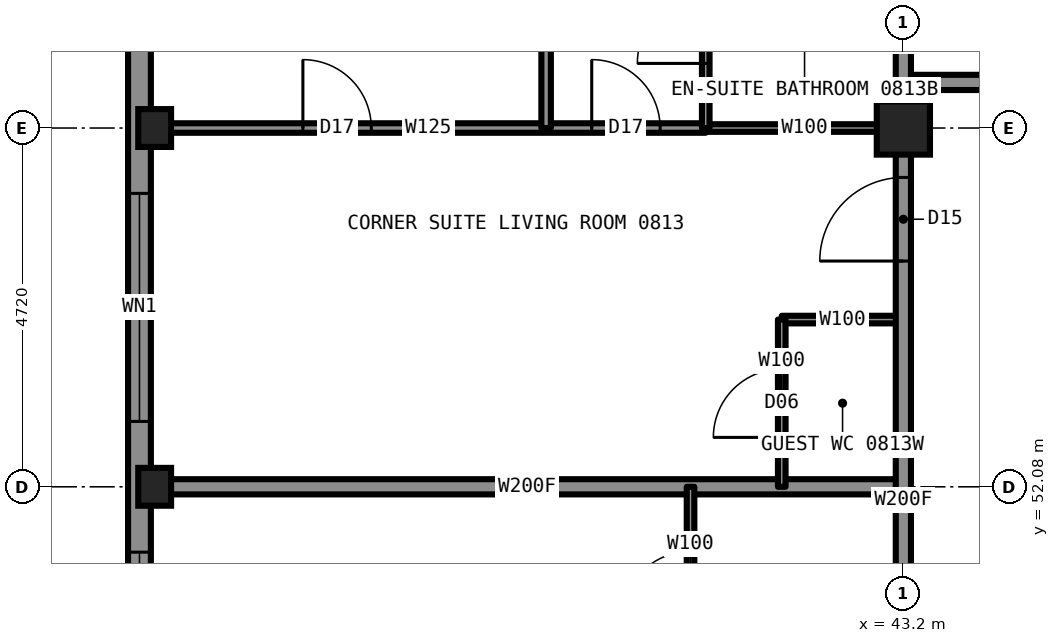
"""IFC4 building model, lengths in metres.
Left out: names, types, materials, properties, quantities, classifications, styles, units other than length and angle.
Written with IfcOpenShell. Run it as: python <this file> out.ifc"""

import sys

from ifc_helpers import new_model, si_unit, direction, frame, frame_2d, origin, origin_2d, place, context, subcontext, project, spatial, rectangle, hollow_rectangle, i_section, extrude, element, fill, save


model = new_model("IFC4")
c1 = context("Model", 3, precision=1e-05, world=origin(), true_north=direction((0.0, 1.0)))
c2 = subcontext(c1, "Body", "Model", "MODEL_VIEW")
j1 = project(units=[si_unit("LENGTHUNIT", "METRE"), si_unit("PLANEANGLEUNIT", "RADIAN")], contexts=[c1])
p1 = place(None, origin())
s1 = spatial("IfcSite", under=j1, at=p1, CompositionType="ELEMENT")
p2 = place(p1, origin())
s2 = spatial("IfcBuilding", under=s1, at=p2, CompositionType="ELEMENT")
p3 = place(p2, frame((0.0, 0.0, 28.5)))
s3 = spatial("IfcBuildingStorey", under=s2, at=p3, CompositionType="ELEMENT", Elevation=28.5)
for number, where, z_axis, x_axis in (
    (1, (33.35, 52.08, 0.0), (0.0, 0.0, 1.0), (1.0, 0.0, 0.0)),
    (2, (33.35, 56.8, 0.0), (0.0, 0.0, 1.0), (1.0, 0.0, 0.0)),
):
    element("IfcColumn", number, at=place(p3, frame(where, z_axis=z_axis, x_axis=x_axis)), inside=s3, PredefinedType="COLUMN", context=c2, shape_type="SweptSolid", body=[
        extrude(i_section(OverallWidth=0.432, OverallDepth=0.498, WebThickness=0.056, FlangeThickness=0.089, at=origin_2d()), origin(), (0.0, 0.0, 1.0), 3.5),
    ])
p4 = place(p3, frame((43.2, 56.8, 0.0), z_axis=(0.0, 0.0, 1.0), x_axis=(1.0, 0.0, 0.0)))
e3 = element("IfcColumn", 3, at=p4, inside=s3, PredefinedType="COLUMN", context=c2, shape_type="SweptSolid", body=[
    extrude(hollow_rectangle(XDim=0.7, YDim=0.7, WallThickness=0.06, at=origin_2d()), origin(), (0.0, 0.0, 1.0), 3.5),
])
p5 = place(p3, frame((40.6, 56.8, 0.0), z_axis=(0.0, 0.0, 1.0), x_axis=(1.0, 0.0, 0.0)))
e4 = element("IfcWall", 4, at=p5, inside=s3, PredefinedType="PARTITIONING", context=c2, shape_type="SweptSolid", body=[
    extrude(rectangle(XDim=2.6, YDim=0.1, at=frame_2d((1.3, 0.0))), origin(), (0.0, 0.0, 1.0), 2.573),
])
p6 = place(p3, frame((33.3, 56.8, 0.0), z_axis=(0.0, 0.0, 1.0), x_axis=(1.0, 0.0, 0.0)))
e5 = element("IfcWall", 5, at=p6, inside=s3, PredefinedType="PARTITIONING", context=c2, shape_type="SweptSolid", body=[
    extrude(rectangle(XDim=7.3, YDim=0.125, at=frame_2d((3.65, 0.0))), origin(), (0.0, 0.0, 1.0), 2.573),
])
p7 = place(p6, frame((5.8, 0.0, 0.0)))
e6 = element("IfcOpeningElement", 6, at=p7, cuts=e5, PredefinedType="OPENING", context=c2, shape_type="SweptSolid", body=[
    extrude(rectangle(XDim=0.9, YDim=2.2, at=frame_2d((0.45, 1.1))), frame((0.0, 0.073, 0.0), z_axis=(0.0, -1.0, 0.0), x_axis=(1.0, 0.0, 0.0)), (0.0, 0.0, 1.0), 0.145),
])
p8 = place(p6, frame((2.0, 0.0, 0.0)))
e7 = element("IfcOpeningElement", 7, at=p8, cuts=e5, PredefinedType="OPENING", context=c2, shape_type="SweptSolid", body=[
    extrude(rectangle(XDim=0.9, YDim=2.2, at=frame_2d((0.45, 1.1))), frame((0.0, 0.073, 0.0), z_axis=(0.0, -1.0, 0.0), x_axis=(1.0, 0.0, 0.0)), (0.0, 0.0, 1.0), 0.145),
])
p9 = place(p3, frame((43.2, 57.4, 0.0), z_axis=(0.0, 0.0, 1.0), x_axis=(1.0, 0.0, 0.0)))
e8 = element("IfcWall", 8, at=p9, inside=s3, PredefinedType="PARTITIONING", context=c2, shape_type="SweptSolid", body=[
    extrude(rectangle(XDim=23.6, YDim=0.2, at=frame_2d((11.8, 0.0))), origin(), (0.0, 0.0, 1.0), 3.33),
])
p10 = place(p9, frame((1.85, 0.0, 0.0)))
e9 = element("IfcOpeningElement", 9, at=p10, cuts=e8, PredefinedType="OPENING", context=c2, shape_type="SweptSolid", body=[
    extrude(rectangle(XDim=1.1, YDim=2.2, at=frame_2d((0.55, 1.1))), frame((0.0, 0.11, 0.0), z_axis=(0.0, -1.0, 0.0), x_axis=(1.0, 0.0, 0.0)), (0.0, 0.0, 1.0), 0.22),
])
p11 = place(p9, frame((15.62, 0.0, 0.0)))
e10 = element("IfcOpeningElement", 10, at=p11, cuts=e8, PredefinedType="OPENING", context=c2, shape_type="SweptSolid", body=[
    extrude(rectangle(XDim=1.0, YDim=2.2, at=frame_2d((0.5, 1.1))), frame((0.0, 0.11, 0.0), z_axis=(0.0, -1.0, 0.0), x_axis=(1.0, 0.0, 0.0)), (0.0, 0.0, 1.0), 0.22),
])
p12 = place(p9, frame((20.34, 0.0, 0.0)))
e11 = element("IfcOpeningElement", 11, at=p12, cuts=e8, PredefinedType="OPENING", context=c2, shape_type="SweptSolid", body=[
    extrude(rectangle(XDim=1.0, YDim=2.2, at=frame_2d((0.5, 1.1))), frame((0.0, 0.11, 0.0), z_axis=(0.0, -1.0, 0.0), x_axis=(1.0, 0.0, 0.0)), (0.0, 0.0, 1.0), 0.22),
])
p13 = place(p3, frame((33.3, 52.08, 0.0), z_axis=(0.0, 0.0, 1.0), x_axis=(1.0, 0.0, 0.0)))
e12 = element("IfcWall", 12, at=p13, inside=s3, PredefinedType="PARTITIONING", context=c2, shape_type="SweptSolid", body=[
    extrude(rectangle(XDim=9.9, YDim=0.2, at=frame_2d((4.95, 0.0))), origin(), (0.0, 0.0, 1.0), 2.573),
])
p14 = place(p3, frame((41.6, 54.28, 0.0), z_axis=(0.0, 0.0, 1.0), x_axis=(1.0, 0.0, 0.0)))
e13 = element("IfcWall", 13, at=p14, inside=s3, PredefinedType="PARTITIONING", context=c2, shape_type="SweptSolid", body=[
    extrude(rectangle(XDim=1.6, YDim=0.1, at=frame_2d((0.8, 0.0))), origin(), (0.0, 0.0, 1.0), 2.723),
])
p15 = place(p3, frame((43.2, 33.22, 0.0), z_axis=(0.0, 0.0, 1.0), x_axis=(0.0, 1.0, 0.0)))
e14 = element("IfcWall", 14, at=p15, inside=s3, PredefinedType="PARTITIONING", context=c2, shape_type="SweptSolid", body=[
    extrude(rectangle(XDim=23.56, YDim=0.2, at=frame_2d((11.78, 0.0))), origin(), (0.0, 0.0, 1.0), 3.33),
])
p16 = place(p15, frame((6.16, 0.0, 0.0)))
e15 = element("IfcOpeningElement", 15, at=p16, cuts=e14, PredefinedType="OPENING", context=c2, shape_type="SweptSolid", body=[
    extrude(rectangle(XDim=1.0, YDim=2.2, at=frame_2d((0.5, 1.1))), frame((0.0, 0.11, 0.0), z_axis=(0.0, -1.0, 0.0), x_axis=(1.0, 0.0, 0.0)), (0.0, 0.0, 1.0), 0.22),
])
p17 = place(p15, frame((11.68, 0.0, 0.0)))
e16 = element("IfcOpeningElement", 16, at=p17, cuts=e14, PredefinedType="OPENING", context=c2, shape_type="SweptSolid", body=[
    extrude(rectangle(XDim=1.0, YDim=2.2, at=frame_2d((0.5, 1.1))), frame((0.0, 0.11, 0.0), z_axis=(0.0, -1.0, 0.0), x_axis=(1.0, 0.0, 0.0)), (0.0, 0.0, 1.0), 0.22),
])
p18 = place(p15, frame((14.54, 0.0, 0.0)))
e17 = element("IfcOpeningElement", 17, at=p18, cuts=e14, PredefinedType="OPENING", context=c2, shape_type="SweptSolid", body=[
    extrude(rectangle(XDim=1.0, YDim=2.2, at=frame_2d((0.5, 1.1))), frame((0.0, 0.11, 0.0), z_axis=(0.0, -1.0, 0.0), x_axis=(1.0, 0.0, 0.0)), (0.0, 0.0, 1.0), 0.22),
])
p19 = place(p15, frame((21.83, 0.0, 0.0)))
e18 = element("IfcOpeningElement", 18, at=p19, cuts=e14, PredefinedType="OPENING", context=c2, shape_type="SweptSolid", body=[
    extrude(rectangle(XDim=1.1, YDim=2.2, at=frame_2d((0.55, 1.1))), frame((0.0, 0.11, 0.0), z_axis=(0.0, -1.0, 0.0), x_axis=(1.0, 0.0, 0.0)), (0.0, 0.0, 1.0), 0.22),
])
p20 = place(p15, frame((0.63, 0.0, 0.0)))
e19 = element("IfcOpeningElement", 19, at=p20, cuts=e14, PredefinedType="OPENING", context=c2, shape_type="SweptSolid", body=[
    extrude(rectangle(XDim=1.1, YDim=2.2, at=frame_2d((0.55, 1.1))), frame((0.0, 0.11, 0.0), z_axis=(0.0, -1.0, 0.0), x_axis=(1.0, 0.0, 0.0)), (0.0, 0.0, 1.0), 0.22),
])
p21 = place(p3, frame((43.2, 57.4, 0.0), z_axis=(0.0, 0.0, 1.0), x_axis=(0.0, 1.0, 0.0)))
e20 = element("IfcWall", 20, at=p21, inside=s3, PredefinedType="PARTITIONING", context=c2, shape_type="SweptSolid", body=[
    extrude(rectangle(XDim=2.0, YDim=0.2, at=frame_2d((1.0, 0.0))), origin(), (0.0, 0.0, 1.0), 2.573),
])
p22 = place(p3, frame((41.6, 52.08, 0.0), z_axis=(0.0, 0.0, 1.0), x_axis=(0.0, 1.0, 0.0)))
e21 = element("IfcWall", 21, at=p22, inside=s3, PredefinedType="PARTITIONING", context=c2, shape_type="SweptSolid", body=[
    extrude(rectangle(XDim=2.2, YDim=0.1, at=frame_2d((1.1, 0.0))), origin(), (0.0, 0.0, 1.0), 3.33),
])
p23 = place(p22, frame((0.65, 0.0, 0.0)))
e22 = element("IfcOpeningElement", 22, at=p23, cuts=e21, PredefinedType="OPENING", context=c2, shape_type="SweptSolid", body=[
    extrude(rectangle(XDim=0.9, YDim=2.1, at=frame_2d((0.45, 1.05))), frame((0.0, 0.06, 0.0), z_axis=(0.0, -1.0, 0.0), x_axis=(1.0, 0.0, 0.0)), (0.0, 0.0, 1.0), 0.12),
])
p24 = place(p3, frame((40.6, 56.8, 0.0), z_axis=(0.0, 0.0, 1.0), x_axis=(0.0, 1.0, 0.0)))
e23 = element("IfcWall", 23, at=p24, inside=s3, PredefinedType="PARTITIONING", context=c2, shape_type="SweptSolid", body=[
    extrude(rectangle(XDim=2.6, YDim=0.1, at=frame_2d((1.3, 0.0))), origin(), (0.0, 0.0, 1.0), 3.33),
])
p25 = place(p24, frame((0.85, 0.0, 0.0)))
e24 = element("IfcOpeningElement", 24, at=p25, cuts=e23, PredefinedType="OPENING", context=c2, shape_type="SweptSolid", body=[
    extrude(rectangle(XDim=0.9, YDim=2.1, at=frame_2d((0.45, 1.05))), frame((0.0, 0.06, 0.0), z_axis=(0.0, -1.0, 0.0), x_axis=(1.0, 0.0, 0.0)), (0.0, 0.0, 1.0), 0.12),
])
p26 = place(p3, frame((40.4, 49.48, 0.0), z_axis=(0.0, 0.0, 1.0), x_axis=(0.0, 1.0, 0.0)))
e25 = element("IfcWall", 25, at=p26, inside=s3, PredefinedType="PARTITIONING", context=c2, shape_type="SweptSolid", body=[
    extrude(rectangle(XDim=2.6, YDim=0.1, at=frame_2d((1.3, 0.0))), origin(), (0.0, 0.0, 1.0), 3.33),
])
p27 = place(p26, frame((0.85, 0.0, 0.0)))
e26 = element("IfcOpeningElement", 26, at=p27, cuts=e25, PredefinedType="OPENING", context=c2, shape_type="SweptSolid", body=[
    extrude(rectangle(XDim=0.9, YDim=2.1, at=frame_2d((0.45, 1.05))), frame((0.0, 0.06, 0.0), z_axis=(0.0, -1.0, 0.0), x_axis=(1.0, 0.0, 0.0)), (0.0, 0.0, 1.0), 0.12),
])
p28 = place(p3, frame((38.5, 56.8, 0.0), z_axis=(0.0, 0.0, 1.0), x_axis=(0.0, 1.0, 0.0)))
e27 = element("IfcWall", 27, at=p28, inside=s3, PredefinedType="PARTITIONING", context=c2, shape_type="SweptSolid", body=[
    extrude(rectangle(XDim=9.894, YDim=0.125, at=frame_2d((4.947, 0.0))), origin(), (0.0, 0.0, 1.0), 3.33),
])
p29 = place(p3, frame((33.15, 61.5, 0.0), z_axis=(0.0, 0.0, 1.0), x_axis=(0.0, -1.0, 0.0)))
e28 = element("IfcWall", 28, at=p29, inside=s3, PredefinedType="SOLIDWALL", context=c2, shape_type="SweptSolid", body=[
    extrude(rectangle(XDim=33.0, YDim=0.3, at=frame_2d((16.5, 0.0))), origin(), (0.0, 0.0, 1.0), 2.83),
])
p30 = place(p29, frame((0.85, 0.0, 0.5)))
e29 = element("IfcOpeningElement", 29, at=p30, cuts=e28, PredefinedType="OPENING", context=c2, shape_type="SweptSolid", body=[
    extrude(rectangle(XDim=3.0, YDim=2.0, at=frame_2d((1.5, 1.0))), frame((0.0, 0.16, 0.0), z_axis=(0.0, -1.0, 0.0), x_axis=(1.0, 0.0, 0.0)), (0.0, 0.0, 1.0), 0.32),
])
p31 = place(p29, frame((5.56, 0.0, 0.5)))
e30 = element("IfcOpeningElement", 30, at=p31, cuts=e28, PredefinedType="OPENING", context=c2, shape_type="SweptSolid", body=[
    extrude(rectangle(XDim=3.0, YDim=2.0, at=frame_2d((1.5, 1.0))), frame((0.0, 0.16, 0.0), z_axis=(0.0, -1.0, 0.0), x_axis=(1.0, 0.0, 0.0)), (0.0, 0.0, 1.0), 0.32),
])
p32 = place(p29, frame((10.28, 0.0, 0.5)))
e31 = element("IfcOpeningElement", 31, at=p32, cuts=e28, PredefinedType="OPENING", context=c2, shape_type="SweptSolid", body=[
    extrude(rectangle(XDim=3.0, YDim=2.0, at=frame_2d((1.5, 1.0))), frame((0.0, 0.16, 0.0), z_axis=(0.0, -1.0, 0.0), x_axis=(1.0, 0.0, 0.0)), (0.0, 0.0, 1.0), 0.32),
])
p33 = place(p29, frame((15.0, 0.0, 0.5)))
e32 = element("IfcOpeningElement", 32, at=p33, cuts=e28, PredefinedType="OPENING", context=c2, shape_type="SweptSolid", body=[
    extrude(rectangle(XDim=3.0, YDim=2.0, at=frame_2d((1.5, 1.0))), frame((0.0, 0.16, 0.0), z_axis=(0.0, -1.0, 0.0), x_axis=(1.0, 0.0, 0.0)), (0.0, 0.0, 1.0), 0.32),
])
p34 = place(p29, frame((19.72, 0.0, 0.5)))
e33 = element("IfcOpeningElement", 33, at=p34, cuts=e28, PredefinedType="OPENING", context=c2, shape_type="SweptSolid", body=[
    extrude(rectangle(XDim=3.0, YDim=2.0, at=frame_2d((1.5, 1.0))), frame((0.0, 0.16, 0.0), z_axis=(0.0, -1.0, 0.0), x_axis=(1.0, 0.0, 0.0)), (0.0, 0.0, 1.0), 0.32),
])
p35 = place(p29, frame((24.44, 0.0, 0.5)))
e34 = element("IfcOpeningElement", 34, at=p35, cuts=e28, PredefinedType="OPENING", context=c2, shape_type="SweptSolid", body=[
    extrude(rectangle(XDim=3.0, YDim=2.0, at=frame_2d((1.5, 1.0))), frame((0.0, 0.16, 0.0), z_axis=(0.0, -1.0, 0.0), x_axis=(1.0, 0.0, 0.0)), (0.0, 0.0, 1.0), 0.32),
])
p36 = place(p29, frame((29.15, 0.0, 0.5)))
e35 = element("IfcOpeningElement", 35, at=p36, cuts=e28, PredefinedType="OPENING", context=c2, shape_type="SweptSolid", body=[
    extrude(rectangle(XDim=3.0, YDim=2.0, at=frame_2d((1.5, 1.0))), frame((0.0, 0.16, 0.0), z_axis=(0.0, -1.0, 0.0), x_axis=(1.0, 0.0, 0.0)), (0.0, 0.0, 1.0), 0.32),
])
p37 = place(p3, frame((43.2, 56.78, 0.0), z_axis=(0.0, 0.0, 1.0), x_axis=(0.0, 1.0, 0.0)))
e36 = element("IfcWall", 36, at=p37, inside=s3, PredefinedType="PARTITIONING", context=c2, shape_type="SweptSolid", body=[
    extrude(rectangle(XDim=0.62, YDim=0.2, at=frame_2d((0.31, 0.0))), origin(), (0.0, 0.0, 1.0), 2.573),
])
p38 = place(p27, origin())
e37 = element("IfcDoor", 37, at=p38, inside=s3, OperationType="SINGLE_SWING_RIGHT", PredefinedType="DOOR", context=c2, shape_type="SweptSolid", body=[
    extrude(rectangle(XDim=0.9, YDim=2.1, at=frame_2d((0.45, 1.05))), frame((0.0, 0.025, 0.0), z_axis=(0.0, -1.0, 0.0), x_axis=(1.0, 0.0, 0.0)), (0.0, 0.0, 1.0), 0.05),
])
fill(e26, e37)
p39 = place(p19, origin())
e38 = element("IfcDoor", 38, at=p39, inside=s3, OperationType="SINGLE_SWING_LEFT", PredefinedType="DOOR", context=c2, shape_type="SweptSolid", body=[
    extrude(rectangle(XDim=1.1, YDim=2.2, at=frame_2d((0.55, 1.1))), frame((0.0, 0.025, 0.0), z_axis=(0.0, -1.0, 0.0), x_axis=(1.0, 0.0, 0.0)), (0.0, 0.0, 1.0), 0.05),
])
fill(e18, e38)
p40 = place(p25, origin())
e39 = element("IfcDoor", 39, at=p40, inside=s3, OperationType="SINGLE_SWING_RIGHT", PredefinedType="DOOR", context=c2, shape_type="SweptSolid", body=[
    extrude(rectangle(XDim=0.9, YDim=2.1, at=frame_2d((0.45, 1.05))), frame((0.0, 0.025, 0.0), z_axis=(0.0, -1.0, 0.0), x_axis=(1.0, 0.0, 0.0)), (0.0, 0.0, 1.0), 0.05),
])
fill(e24, e39)
p41 = place(p7, origin())
e40 = element("IfcDoor", 40, at=p41, inside=s3, OperationType="SINGLE_SWING_LEFT", PredefinedType="DOOR", context=c2, shape_type="SweptSolid", body=[
    extrude(rectangle(XDim=0.9, YDim=2.2, at=frame_2d((0.45, 1.1))), frame((0.0, 0.025, 0.0), z_axis=(0.0, -1.0, 0.0), x_axis=(1.0, 0.0, 0.0)), (0.0, 0.0, 1.0), 0.05),
])
fill(e6, e40)
p42 = place(p8, origin())
e41 = element("IfcDoor", 41, at=p42, inside=s3, OperationType="SINGLE_SWING_LEFT", PredefinedType="DOOR", context=c2, shape_type="SweptSolid", body=[
    extrude(rectangle(XDim=0.9, YDim=2.2, at=frame_2d((0.45, 1.1))), frame((0.0, 0.025, 0.0), z_axis=(0.0, -1.0, 0.0), x_axis=(1.0, 0.0, 0.0)), (0.0, 0.0, 1.0), 0.05),
])
fill(e7, e41)
p43 = place(p23, origin())
e42 = element("IfcDoor", 42, at=p43, inside=s3, OperationType="SINGLE_SWING_LEFT", PredefinedType="DOOR", context=c2, shape_type="SweptSolid", body=[
    extrude(rectangle(XDim=0.9, YDim=2.1, at=frame_2d((0.45, 1.05))), frame((0.0, 0.025, 0.0), z_axis=(0.0, -1.0, 0.0), x_axis=(1.0, 0.0, 0.0)), (0.0, 0.0, 1.0), 0.05),
])
fill(e22, e42)
p44 = place(p30, origin())
e43 = element("IfcWindow", 43, at=p44, inside=s3, PartitioningType="SINGLE_PANEL", PredefinedType="WINDOW", context=c2, shape_type="SweptSolid", body=[
    extrude(rectangle(XDim=3.0, YDim=2.0, at=frame_2d((1.5, 1.0))), frame((0.0, 0.03, 0.0), z_axis=(0.0, -1.0, 0.0), x_axis=(1.0, 0.0, 0.0)), (0.0, 0.0, 1.0), 0.06),
])
fill(e29, e43)
p45 = place(p31, origin())
e44 = element("IfcWindow", 44, at=p45, inside=s3, PartitioningType="SINGLE_PANEL", PredefinedType="WINDOW", context=c2, shape_type="SweptSolid", body=[
    extrude(rectangle(XDim=3.0, YDim=2.0, at=frame_2d((1.5, 1.0))), frame((0.0, 0.03, 0.0), z_axis=(0.0, -1.0, 0.0), x_axis=(1.0, 0.0, 0.0)), (0.0, 0.0, 1.0), 0.06),
])
fill(e30, e44)
p46 = place(p32, origin())
e45 = element("IfcWindow", 45, at=p46, inside=s3, PartitioningType="SINGLE_PANEL", PredefinedType="WINDOW", context=c2, shape_type="SweptSolid", body=[
    extrude(rectangle(XDim=3.0, YDim=2.0, at=frame_2d((1.5, 1.0))), frame((0.0, 0.03, 0.0), z_axis=(0.0, -1.0, 0.0), x_axis=(1.0, 0.0, 0.0)), (0.0, 0.0, 1.0), 0.06),
])
fill(e31, e45)
save(model, sys.argv[1])
